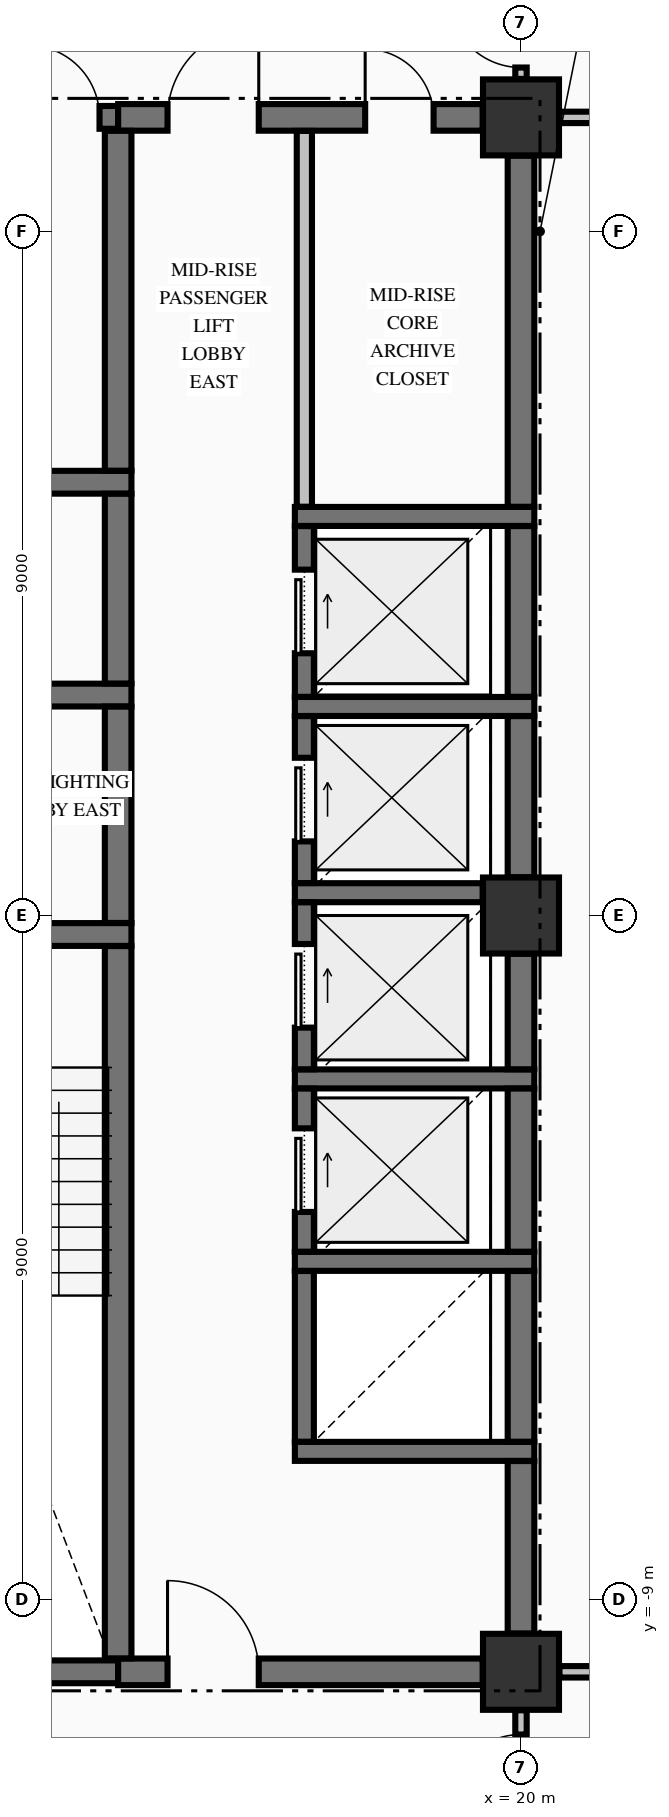
"""IFC4 building model, lengths in metres.
Left out: names, types, materials, properties, quantities, classifications, styles, units other than length and angle.
Written with IfcOpenShell. Run it as: python <this file> out.ifc"""

import sys

from ifc_helpers import new_model, si_unit, direction, frame, frame_2d, origin, origin_2d, place, context, subcontext, project, spatial, rectangle, extrude, element, fill, save


model = new_model("IFC4")
c1 = context("Model", 3, precision=1e-05, world=origin(), true_north=direction((0.0, 1.0)))
c2 = subcontext(c1, "Body", "Model", "MODEL_VIEW")
j1 = project(units=[si_unit("LENGTHUNIT", "METRE"), si_unit("PLANEANGLEUNIT", "RADIAN")], contexts=[c1])
p1 = place(None, origin())
s1 = spatial("IfcSite", under=j1, at=p1, CompositionType="ELEMENT")
p2 = place(p1, origin())
s2 = spatial("IfcBuilding", under=s1, at=p2, CompositionType="ELEMENT")
p3 = place(p2, frame((0.0, 0.0, 98.5)))
s3 = spatial("IfcBuildingStorey", under=s2, at=p3, CompositionType="ELEMENT", Elevation=98.5)
for number, where, z_axis, x_axis in (
    (1, (20.0, -9.95, -0.275), (0.0, 0.0, 1.0), (1.0, 0.0, 0.0)),
    (2, (20.0, 10.5, -0.275), (0.0, 0.0, 1.0), (1.0, 0.0, 0.0)),
    (3, (20.0, 0.0, -0.275), (0.0, 0.0, 1.0), (1.0, 0.0, 0.0)),
):
    element("IfcColumn", number, at=place(p3, frame(where, z_axis=z_axis, x_axis=x_axis)), inside=s3, PredefinedType="COLUMN", context=c2, shape_type="SweptSolid", body=[
        extrude(rectangle(XDim=1.0, YDim=1.0, at=origin_2d()), origin(), (0.0, 0.0, 1.0), 3.595),
    ])
p4 = place(p3, frame((11.504, -9.95, 0.0), z_axis=(0.0, 0.0, 1.0), x_axis=(1.0, 0.0, 0.0)))
e4 = element("IfcWall", 4, at=p4, inside=s3, PredefinedType="SHEAR", context=c2, shape_type="SweptSolid", body=[
    extrude(rectangle(XDim=3.196, YDim=0.3, at=frame_2d((1.598, 0.0))), origin(), (0.0, 0.0, 1.0), 3.32),
])
p5 = place(p3, frame((14.7, -9.95, 0.0), z_axis=(0.0, 0.0, 1.0), x_axis=(1.0, 0.0, 0.0)))
e5 = element("IfcWall", 5, at=p5, inside=s3, PredefinedType="SHEAR", context=c2, shape_type="SweptSolid", body=[
    extrude(rectangle(XDim=4.796, YDim=0.35, at=frame_2d((2.398, 0.0))), origin(), (0.0, 0.0, 1.0), 3.32),
])
p6 = place(p5, frame((0.65, 0.0, 0.0)))
e6 = element("IfcOpeningElement", 6, at=p6, cuts=e5, PredefinedType="OPENING", context=c2, shape_type="SweptSolid", body=[
    extrude(rectangle(XDim=1.2, YDim=2.15, at=frame_2d((0.6, 1.075))), frame((0.0, 0.185, 0.0), z_axis=(0.0, -1.0, 0.0), x_axis=(1.0, 0.0, 0.0)), (0.0, 0.0, 1.0), 0.37),
])
for number, where, z_axis, x_axis in (
    (7, (17.025, -7.05, 0.0), (0.0, 0.0, 1.0), (1.0, 0.0, 0.0)),
    (8, (17.025, -4.55, 0.0), (0.0, 0.0, 1.0), (1.0, 0.0, 0.0)),
    (9, (17.025, -2.15, 0.0), (0.0, 0.0, 1.0), (1.0, 0.0, 0.0)),
):
    element("IfcWall", number, at=place(p3, frame(where, z_axis=z_axis, x_axis=x_axis)), inside=s3, PredefinedType="SOLIDWALL", context=c2, shape_type="SweptSolid", body=[
        extrude(rectangle(XDim=3.15, YDim=0.25, at=frame_2d((1.575, 0.0))), origin(), (0.0, 0.0, 1.0), 3.32),
    ])
p7 = place(p3, frame((11.504, -0.25, 0.0), z_axis=(0.0, 0.0, 1.0), x_axis=(1.0, 0.0, 0.0)))
e10 = element("IfcWall", 10, at=p7, inside=s3, PredefinedType="SHEAR", context=c2, shape_type="SweptSolid", body=[
    extrude(rectangle(XDim=3.371, YDim=0.3, at=frame_2d((1.686, 0.0))), origin(), (0.0, 0.0, 1.0), 3.32),
])
p8 = place(p7, frame((1.096, 0.0, 0.0)))
e11 = element("IfcOpeningElement", 11, at=p8, cuts=e10, PredefinedType="OPENING", context=c2, shape_type="SweptSolid", body=[
    extrude(rectangle(XDim=1.1, YDim=2.15, at=frame_2d((0.55, 1.075))), frame((0.0, 0.16, 0.0), z_axis=(0.0, -1.0, 0.0), x_axis=(1.0, 0.0, 0.0)), (0.0, 0.0, 1.0), 0.32),
])
p9 = place(p3, frame((17.025, 0.3, 0.0), z_axis=(0.0, 0.0, 1.0), x_axis=(1.0, 0.0, 0.0)))
e12 = element("IfcWall", 12, at=p9, inside=s3, PredefinedType="SOLIDWALL", context=c2, shape_type="SweptSolid", body=[
    extrude(rectangle(XDim=2.471, YDim=0.25, at=frame_2d((1.236, 0.0))), origin(), (0.0, 0.0, 1.0), 3.32),
])
p10 = place(p3, frame((17.025, 2.75, 0.0), z_axis=(0.0, 0.0, 1.0), x_axis=(1.0, 0.0, 0.0)))
e13 = element("IfcWall", 13, at=p10, inside=s3, PredefinedType="SOLIDWALL", context=c2, shape_type="SweptSolid", body=[
    extrude(rectangle(XDim=3.15, YDim=0.25, at=frame_2d((1.575, 0.0))), origin(), (0.0, 0.0, 1.0), 3.32),
])
p11 = place(p3, frame((10.85, 2.9, 0.0), z_axis=(0.0, 0.0, 1.0), x_axis=(1.0, 0.0, 0.0)))
e14 = element("IfcWall", 14, at=p11, inside=s3, PredefinedType="SHEAR", context=c2, shape_type="SweptSolid", body=[
    extrude(rectangle(XDim=4.025, YDim=0.3, at=frame_2d((2.012, 0.0))), origin(), (0.0, 0.0, 1.0), 3.32),
])
p12 = place(p11, frame((0.85, 0.0, 0.0)))
e15 = element("IfcOpeningElement", 15, at=p12, cuts=e14, PredefinedType="OPENING", context=c2, shape_type="SweptSolid", body=[
    extrude(rectangle(XDim=1.1, YDim=2.2, at=frame_2d((0.55, 1.1))), frame((0.0, 0.16, 0.0), z_axis=(0.0, -1.0, 0.0), x_axis=(1.0, 0.0, 0.0)), (0.0, 0.0, 1.0), 0.32),
])
p13 = place(p3, frame((17.025, 5.25, 0.0), z_axis=(0.0, 0.0, 1.0), x_axis=(1.0, 0.0, 0.0)))
e16 = element("IfcWall", 16, at=p13, inside=s3, PredefinedType="SOLIDWALL", context=c2, shape_type="SweptSolid", body=[
    extrude(rectangle(XDim=3.15, YDim=0.25, at=frame_2d((1.575, 0.0))), origin(), (0.0, 0.0, 1.0), 3.32),
])
p14 = place(p3, frame((10.85, 5.7, 0.0), z_axis=(0.0, 0.0, 1.0), x_axis=(1.0, 0.0, 0.0)))
e17 = element("IfcWall", 17, at=p14, inside=s3, PredefinedType="SHEAR", context=c2, shape_type="SweptSolid", body=[
    extrude(rectangle(XDim=4.025, YDim=0.3, at=frame_2d((2.012, 0.0))), origin(), (0.0, 0.0, 1.0), 3.32),
])
p15 = place(p3, frame((11.504, 10.5, 0.0), z_axis=(0.0, 0.0, 1.0), x_axis=(1.0, 0.0, 0.0)))
e18 = element("IfcWall", 18, at=p15, inside=s3, PredefinedType="SHEAR", context=c2, shape_type="SweptSolid", body=[
    extrude(rectangle(XDim=3.196, YDim=0.3, at=frame_2d((1.598, 0.0))), origin(), (0.0, 0.0, 1.0), 3.32),
])
p16 = place(p15, frame((2.001, 0.0, 0.0)))
e19 = element("IfcOpeningElement", 19, at=p16, cuts=e18, PredefinedType="OPENING", context=c2, shape_type="SweptSolid", body=[
    extrude(rectangle(XDim=0.95, YDim=2.15, at=frame_2d((0.475, 1.075))), frame((0.0, 0.16, 0.0), z_axis=(0.0, -1.0, 0.0), x_axis=(1.0, 0.0, 0.0)), (0.0, 0.0, 1.0), 0.32),
])
p17 = place(p3, frame((14.7, 10.5, 0.0), z_axis=(0.0, 0.0, 1.0), x_axis=(1.0, 0.0, 0.0)))
e20 = element("IfcWall", 20, at=p17, inside=s3, PredefinedType="SHEAR", context=c2, shape_type="SweptSolid", body=[
    extrude(rectangle(XDim=4.796, YDim=0.35, at=frame_2d((2.398, 0.0))), origin(), (0.0, 0.0, 1.0), 3.32),
])
p18 = place(p17, frame((0.65, 0.0, 0.0)))
e21 = element("IfcOpeningElement", 21, at=p18, cuts=e20, PredefinedType="OPENING", context=c2, shape_type="SweptSolid", body=[
    extrude(rectangle(XDim=1.2, YDim=2.15, at=frame_2d((0.6, 1.075))), frame((0.0, 0.185, 0.0), z_axis=(0.0, -1.0, 0.0), x_axis=(1.0, 0.0, 0.0)), (0.0, 0.0, 1.0), 0.37),
])
p19 = place(p17, frame((3.25, 0.0, 0.0)))
e22 = element("IfcOpeningElement", 22, at=p19, cuts=e20, PredefinedType="OPENING", context=c2, shape_type="SweptSolid", body=[
    extrude(rectangle(XDim=0.9, YDim=2.15, at=frame_2d((0.45, 1.075))), frame((0.0, 0.185, 0.0), z_axis=(0.0, -1.0, 0.0), x_axis=(1.0, 0.0, 0.0)), (0.0, 0.0, 1.0), 0.37),
])
p20 = place(p3, frame((20.506, -9.95, 0.0), z_axis=(0.0, 0.0, 1.0), x_axis=(1.0, 0.0, 0.0)))
e23 = element("IfcWall", 23, at=p20, inside=s3, PredefinedType="PARTITIONING", context=c2, shape_type="SweptSolid", body=[
    extrude(rectangle(XDim=7.329, YDim=0.15, at=frame_2d((3.665, 0.0))), origin(), (0.0, 0.0, 1.0), 3.32),
])
p21 = place(p20, frame((2.994, 0.0, 0.0)))
e24 = element("IfcOpeningElement", 24, at=p21, cuts=e23, PredefinedType="OPENING", context=c2, shape_type="SweptSolid", body=[
    extrude(rectangle(XDim=1.0, YDim=2.15, at=frame_2d((0.5, 1.075))), frame((0.0, 0.085, 0.0), z_axis=(0.0, -1.0, 0.0), x_axis=(1.0, 0.0, 0.0)), (0.0, 0.0, 1.0), 0.17),
])
p22 = place(p3, frame((20.506, 10.5, 0.0), z_axis=(0.0, 0.0, 1.0), x_axis=(1.0, 0.0, 0.0)))
e25 = element("IfcWall", 25, at=p22, inside=s3, PredefinedType="PARTITIONING", context=c2, shape_type="SweptSolid", body=[
    extrude(rectangle(XDim=7.329, YDim=0.15, at=frame_2d((3.665, 0.0))), origin(), (0.0, 0.0, 1.0), 3.32),
])
p23 = place(p22, frame((2.994, 0.0, 0.0)))
e26 = element("IfcOpeningElement", 26, at=p23, cuts=e25, PredefinedType="OPENING", context=c2, shape_type="SweptSolid", body=[
    extrude(rectangle(XDim=1.0, YDim=2.15, at=frame_2d((0.5, 1.075))), frame((0.0, 0.085, 0.0), z_axis=(0.0, -1.0, 0.0), x_axis=(1.0, 0.0, 0.0)), (0.0, 0.0, 1.0), 0.17),
])
p24 = place(p3, frame((14.7, -9.773, 0.0), z_axis=(0.0, 0.0, 1.0), x_axis=(0.0, 1.0, 0.0)))
e27 = element("IfcWall", 27, at=p24, inside=s3, PredefinedType="SHEAR", context=c2, shape_type="SweptSolid", body=[
    extrude(rectangle(XDim=9.371, YDim=0.35, at=frame_2d((4.686, 0.0))), origin(), (0.0, 0.0, 1.0), 3.32),
])
p25 = place(p3, frame((14.7, -0.098, 0.0), z_axis=(0.0, 0.0, 1.0), x_axis=(0.0, 1.0, 0.0)))
e28 = element("IfcWall", 28, at=p25, inside=s3, PredefinedType="SHEAR", context=c2, shape_type="SweptSolid", body=[
    extrude(rectangle(XDim=2.846, YDim=0.35, at=frame_2d((1.423, 0.0))), origin(), (0.0, 0.0, 1.0), 3.32),
])
p26 = place(p3, frame((14.7, 3.052, 0.0), z_axis=(0.0, 0.0, 1.0), x_axis=(0.0, 1.0, 0.0)))
e29 = element("IfcWall", 29, at=p26, inside=s3, PredefinedType="SHEAR", context=c2, shape_type="SweptSolid", body=[
    extrude(rectangle(XDim=2.496, YDim=0.35, at=frame_2d((1.248, 0.0))), origin(), (0.0, 0.0, 1.0), 3.32),
])
p27 = place(p3, frame((14.7, 5.852, 0.0), z_axis=(0.0, 0.0, 1.0), x_axis=(0.0, 1.0, 0.0)))
e30 = element("IfcWall", 30, at=p27, inside=s3, PredefinedType="SHEAR", context=c2, shape_type="SweptSolid", body=[
    extrude(rectangle(XDim=4.471, YDim=0.35, at=frame_2d((2.235, 0.0))), origin(), (0.0, 0.0, 1.0), 3.32),
])
p28 = place(p3, frame((17.15, -6.923, 0.0), z_axis=(0.0, 0.0, 1.0), x_axis=(0.0, 1.0, 0.0)))
e31 = element("IfcWall", 31, at=p28, inside=s3, PredefinedType="SOLIDWALL", context=c2, shape_type="SweptSolid", body=[
    extrude(rectangle(XDim=2.246, YDim=0.25, at=frame_2d((1.123, 0.0))), origin(), (0.0, 0.0, 1.0), 3.32),
])
p29 = place(p3, frame((17.15, -4.423, 0.0), z_axis=(0.0, 0.0, 1.0), x_axis=(0.0, 1.0, 0.0)))
e32 = element("IfcWall", 32, at=p29, inside=s3, PredefinedType="SOLIDWALL", context=c2, shape_type="SweptSolid", body=[
    extrude(rectangle(XDim=2.146, YDim=0.25, at=frame_2d((1.073, 0.0))), origin(), (0.0, 0.0, 1.0), 3.32),
])
p30 = place(p29, frame((0.523, 0.0, 0.0)))
e33 = element("IfcOpeningElement", 33, at=p30, cuts=e32, PredefinedType="OPENING", context=c2, shape_type="SweptSolid", body=[
    extrude(rectangle(XDim=1.1, YDim=2.2, at=frame_2d((0.55, 1.1))), frame((0.0, 0.135, 0.0), z_axis=(0.0, -1.0, 0.0), x_axis=(1.0, 0.0, 0.0)), (0.0, 0.0, 1.0), 0.27),
])
p31 = place(p3, frame((17.15, -2.023, 0.0), z_axis=(0.0, 0.0, 1.0), x_axis=(0.0, 1.0, 0.0)))
e34 = element("IfcWall", 34, at=p31, inside=s3, PredefinedType="SOLIDWALL", context=c2, shape_type="SweptSolid", body=[
    extrude(rectangle(XDim=2.196, YDim=0.25, at=frame_2d((1.098, 0.0))), origin(), (0.0, 0.0, 1.0), 3.32),
])
p32 = place(p31, frame((0.548, 0.0, 0.0)))
e35 = element("IfcOpeningElement", 35, at=p32, cuts=e34, PredefinedType="OPENING", context=c2, shape_type="SweptSolid", body=[
    extrude(rectangle(XDim=1.1, YDim=2.2, at=frame_2d((0.55, 1.1))), frame((0.0, 0.135, 0.0), z_axis=(0.0, -1.0, 0.0), x_axis=(1.0, 0.0, 0.0)), (0.0, 0.0, 1.0), 0.27),
])
p33 = place(p3, frame((17.15, 0.427, 0.0), z_axis=(0.0, 0.0, 1.0), x_axis=(0.0, 1.0, 0.0)))
e36 = element("IfcWall", 36, at=p33, inside=s3, PredefinedType="SOLIDWALL", context=c2, shape_type="SweptSolid", body=[
    extrude(rectangle(XDim=2.196, YDim=0.25, at=frame_2d((1.098, 0.0))), origin(), (0.0, 0.0, 1.0), 3.32),
])
p34 = place(p33, frame((0.548, 0.0, 0.0)))
e37 = element("IfcOpeningElement", 37, at=p34, cuts=e36, PredefinedType="OPENING", context=c2, shape_type="SweptSolid", body=[
    extrude(rectangle(XDim=1.1, YDim=2.2, at=frame_2d((0.55, 1.1))), frame((0.0, 0.135, 0.0), z_axis=(0.0, -1.0, 0.0), x_axis=(1.0, 0.0, 0.0)), (0.0, 0.0, 1.0), 0.27),
])
p35 = place(p3, frame((17.15, 2.877, 0.0), z_axis=(0.0, 0.0, 1.0), x_axis=(0.0, 1.0, 0.0)))
e38 = element("IfcWall", 38, at=p35, inside=s3, PredefinedType="SOLIDWALL", context=c2, shape_type="SweptSolid", body=[
    extrude(rectangle(XDim=2.246, YDim=0.25, at=frame_2d((1.123, 0.0))), origin(), (0.0, 0.0, 1.0), 3.32),
])
p36 = place(p35, frame((0.573, 0.0, 0.0)))
e39 = element("IfcOpeningElement", 39, at=p36, cuts=e38, PredefinedType="OPENING", context=c2, shape_type="SweptSolid", body=[
    extrude(rectangle(XDim=1.1, YDim=2.2, at=frame_2d((0.55, 1.1))), frame((0.0, 0.135, 0.0), z_axis=(0.0, -1.0, 0.0), x_axis=(1.0, 0.0, 0.0)), (0.0, 0.0, 1.0), 0.27),
])
p37 = place(p3, frame((20.0, -9.446, 0.0), z_axis=(0.0, 0.0, 1.0), x_axis=(0.0, 1.0, 0.0)))
e40 = element("IfcWall", 40, at=p37, inside=s3, PredefinedType="SHEAR", context=c2, shape_type="SweptSolid", body=[
    extrude(rectangle(XDim=2.269, YDim=0.35, at=frame_2d((1.135, 0.0))), origin(), (0.0, 0.0, 1.0), 3.32),
])
p38 = place(p3, frame((20.0, -6.923, 0.0), z_axis=(0.0, 0.0, 1.0), x_axis=(0.0, 1.0, 0.0)))
e41 = element("IfcWall", 41, at=p38, inside=s3, PredefinedType="SHEAR", context=c2, shape_type="SweptSolid", body=[
    extrude(rectangle(XDim=2.246, YDim=0.35, at=frame_2d((1.123, 0.0))), origin(), (0.0, 0.0, 1.0), 3.32),
])
p39 = place(p3, frame((20.0, -4.423, 0.0), z_axis=(0.0, 0.0, 1.0), x_axis=(0.0, 1.0, 0.0)))
e42 = element("IfcWall", 42, at=p39, inside=s3, PredefinedType="SHEAR", context=c2, shape_type="SweptSolid", body=[
    extrude(rectangle(XDim=2.146, YDim=0.35, at=frame_2d((1.073, 0.0))), origin(), (0.0, 0.0, 1.0), 3.32),
])
p40 = place(p3, frame((20.0, -2.023, 0.0), z_axis=(0.0, 0.0, 1.0), x_axis=(0.0, 1.0, 0.0)))
e43 = element("IfcWall", 43, at=p40, inside=s3, PredefinedType="SHEAR", context=c2, shape_type="SweptSolid", body=[
    extrude(rectangle(XDim=1.519, YDim=0.35, at=frame_2d((0.76, 0.0))), origin(), (0.0, 0.0, 1.0), 3.32),
])
p41 = place(p3, frame((20.0, 0.504, 0.0), z_axis=(0.0, 0.0, 1.0), x_axis=(0.0, 1.0, 0.0)))
e44 = element("IfcWall", 44, at=p41, inside=s3, PredefinedType="SHEAR", context=c2, shape_type="SweptSolid", body=[
    extrude(rectangle(XDim=2.119, YDim=0.35, at=frame_2d((1.06, 0.0))), origin(), (0.0, 0.0, 1.0), 3.32),
])
p42 = place(p3, frame((20.0, 2.877, 0.0), z_axis=(0.0, 0.0, 1.0), x_axis=(0.0, 1.0, 0.0)))
e45 = element("IfcWall", 45, at=p42, inside=s3, PredefinedType="SHEAR", context=c2, shape_type="SweptSolid", body=[
    extrude(rectangle(XDim=2.246, YDim=0.35, at=frame_2d((1.123, 0.0))), origin(), (0.0, 0.0, 1.0), 3.32),
])
p43 = place(p3, frame((20.0, 5.377, 0.0), z_axis=(0.0, 0.0, 1.0), x_axis=(0.0, 1.0, 0.0)))
e46 = element("IfcWall", 46, at=p43, inside=s3, PredefinedType="SHEAR", context=c2, shape_type="SweptSolid", body=[
    extrude(rectangle(XDim=4.619, YDim=0.35, at=frame_2d((2.31, 0.0))), origin(), (0.0, 0.0, 1.0), 3.32),
])
p44 = place(p3, frame((17.15, 5.378, 0.0), z_axis=(0.0, 0.0, 1.0), x_axis=(0.0, 1.0, 0.0)))
e47 = element("IfcWall", 47, at=p44, inside=s3, PredefinedType="PARTITIONING", context=c2, shape_type="SweptSolid", body=[
    extrude(rectangle(XDim=4.944, YDim=0.2, at=frame_2d((2.472, 0.0))), origin(), (0.0, 0.0, 1.0), 3.32),
])
p45 = place(p3, frame((20.0, -12.472, 0.0), z_axis=(0.0, 0.0, 1.0), x_axis=(0.0, 1.0, 0.0)))
e48 = element("IfcWall", 48, at=p45, inside=s3, PredefinedType="PARTITIONING", context=c2, shape_type="SweptSolid", body=[
    extrude(rectangle(XDim=2.016, YDim=0.15, at=frame_2d((1.008, 0.0))), origin(), (0.0, 0.0, 1.0), 2.81),
])
p46 = place(p45, frame((0.747, 0.0, 0.0)))
e49 = element("IfcOpeningElement", 49, at=p46, cuts=e48, PredefinedType="OPENING", context=c2, shape_type="SweptSolid", body=[
    extrude(rectangle(XDim=0.95, YDim=2.15, at=frame_2d((0.475, 1.075))), frame((0.0, 0.085, 0.0), z_axis=(0.0, -1.0, 0.0), x_axis=(1.0, 0.0, 0.0)), (0.0, 0.0, 1.0), 0.17),
])
p47 = place(p3, frame((20.0, 11.006, 0.0), z_axis=(0.0, 0.0, 1.0), x_axis=(0.0, 1.0, 0.0)))
e50 = element("IfcWall", 50, at=p47, inside=s3, PredefinedType="PARTITIONING", context=c2, shape_type="SweptSolid", body=[
    extrude(rectangle(XDim=1.666, YDim=0.15, at=frame_2d((0.833, 0.0))), origin(), (0.0, 0.0, 1.0), 2.81),
])
p48 = place(p47, frame((0.15, 0.0, 0.0)))
e51 = element("IfcOpeningElement", 51, at=p48, cuts=e50, PredefinedType="OPENING", context=c2, shape_type="SweptSolid", body=[
    extrude(rectangle(XDim=0.95, YDim=2.15, at=frame_2d((0.475, 1.075))), frame((0.0, 0.085, 0.0), z_axis=(0.0, -1.0, 0.0), x_axis=(1.0, 0.0, 0.0)), (0.0, 0.0, 1.0), 0.17),
])
p49 = place(p16, origin())
e52 = element("IfcDoor", 52, at=p49, inside=s3, OperationType="SINGLE_SWING_LEFT", PredefinedType="DOOR", context=c2, shape_type="SweptSolid", body=[
    extrude(rectangle(XDim=0.95, YDim=2.15, at=frame_2d((0.475, 1.075))), frame((0.0, 0.025, 0.0), z_axis=(0.0, -1.0, 0.0), x_axis=(1.0, 0.0, 0.0)), (0.0, 0.0, 1.0), 0.05),
])
fill(e19, e52)
p50 = place(p30, origin())
e53 = element("IfcDoor", 53, at=p50, inside=s3, OperationType="SLIDING_TO_RIGHT", PredefinedType="DOOR", context=c2, shape_type="SweptSolid", body=[
    extrude(rectangle(XDim=1.1, YDim=2.2, at=frame_2d((0.55, 1.1))), frame((0.0, 0.025, 0.0), z_axis=(0.0, -1.0, 0.0), x_axis=(1.0, 0.0, 0.0)), (0.0, 0.0, 1.0), 0.05),
])
fill(e33, e53)
p51 = place(p32, origin())
e54 = element("IfcDoor", 54, at=p51, inside=s3, OperationType="SLIDING_TO_RIGHT", PredefinedType="DOOR", context=c2, shape_type="SweptSolid", body=[
    extrude(rectangle(XDim=1.1, YDim=2.2, at=frame_2d((0.55, 1.1))), frame((0.0, 0.025, 0.0), z_axis=(0.0, -1.0, 0.0), x_axis=(1.0, 0.0, 0.0)), (0.0, 0.0, 1.0), 0.05),
])
fill(e35, e54)
p52 = place(p34, origin())
e55 = element("IfcDoor", 55, at=p52, inside=s3, OperationType="SLIDING_TO_RIGHT", PredefinedType="DOOR", context=c2, shape_type="SweptSolid", body=[
    extrude(rectangle(XDim=1.1, YDim=2.2, at=frame_2d((0.55, 1.1))), frame((0.0, 0.025, 0.0), z_axis=(0.0, -1.0, 0.0), x_axis=(1.0, 0.0, 0.0)), (0.0, 0.0, 1.0), 0.05),
])
fill(e37, e55)
p53 = place(p36, origin())
e56 = element("IfcDoor", 56, at=p53, inside=s3, OperationType="SLIDING_TO_RIGHT", PredefinedType="DOOR", context=c2, shape_type="SweptSolid", body=[
    extrude(rectangle(XDim=1.1, YDim=2.2, at=frame_2d((0.55, 1.1))), frame((0.0, 0.025, 0.0), z_axis=(0.0, -1.0, 0.0), x_axis=(1.0, 0.0, 0.0)), (0.0, 0.0, 1.0), 0.05),
])
fill(e39, e56)
p54 = place(p6, origin())
e57 = element("IfcDoor", 57, at=p54, inside=s3, OperationType="SINGLE_SWING_LEFT", PredefinedType="DOOR", context=c2, shape_type="SweptSolid", body=[
    extrude(rectangle(XDim=1.2, YDim=2.15, at=frame_2d((0.6, 1.075))), frame((0.0, 0.025, 0.0), z_axis=(0.0, -1.0, 0.0), x_axis=(1.0, 0.0, 0.0)), (0.0, 0.0, 1.0), 0.05),
])
fill(e6, e57)
p55 = place(p18, origin())
e58 = element("IfcDoor", 58, at=p55, inside=s3, OperationType="SINGLE_SWING_RIGHT", PredefinedType="DOOR", context=c2, shape_type="SweptSolid", body=[
    extrude(rectangle(XDim=1.2, YDim=2.15, at=frame_2d((0.6, 1.075))), frame((0.0, 0.025, 0.0), z_axis=(0.0, -1.0, 0.0), x_axis=(1.0, 0.0, 0.0)), (0.0, 0.0, 1.0), 0.05),
])
fill(e21, e58)
p56 = place(p19, origin())
e59 = element("IfcDoor", 59, at=p56, inside=s3, OperationType="SINGLE_SWING_LEFT", PredefinedType="DOOR", context=c2, shape_type="SweptSolid", body=[
    extrude(rectangle(XDim=0.9, YDim=2.15, at=frame_2d((0.45, 1.075))), frame((0.0, 0.025, 0.0), z_axis=(0.0, -1.0, 0.0), x_axis=(1.0, 0.0, 0.0)), (0.0, 0.0, 1.0), 0.05),
])
fill(e22, e59)
p57 = place(p48, origin())
e60 = element("IfcDoor", 60, at=p57, inside=s3, OperationType="SINGLE_SWING_RIGHT", PredefinedType="DOOR", context=c2, shape_type="SweptSolid", body=[
    extrude(rectangle(XDim=0.95, YDim=2.15, at=frame_2d((0.475, 1.075))), frame((0.0, 0.025, 0.0), z_axis=(0.0, -1.0, 0.0), x_axis=(1.0, 0.0, 0.0)), (0.0, 0.0, 1.0), 0.05),
])
fill(e51, e60)
p58 = place(p46, origin())
e61 = element("IfcDoor", 61, at=p58, inside=s3, OperationType="SINGLE_SWING_LEFT", PredefinedType="DOOR", context=c2, shape_type="SweptSolid", body=[
    extrude(rectangle(XDim=0.95, YDim=2.15, at=frame_2d((0.475, 1.075))), frame((0.0, 0.025, 0.0), z_axis=(0.0, -1.0, 0.0), x_axis=(1.0, 0.0, 0.0)), (0.0, 0.0, 1.0), 0.05),
])
fill(e49, e61)
save(model, sys.argv[1])
